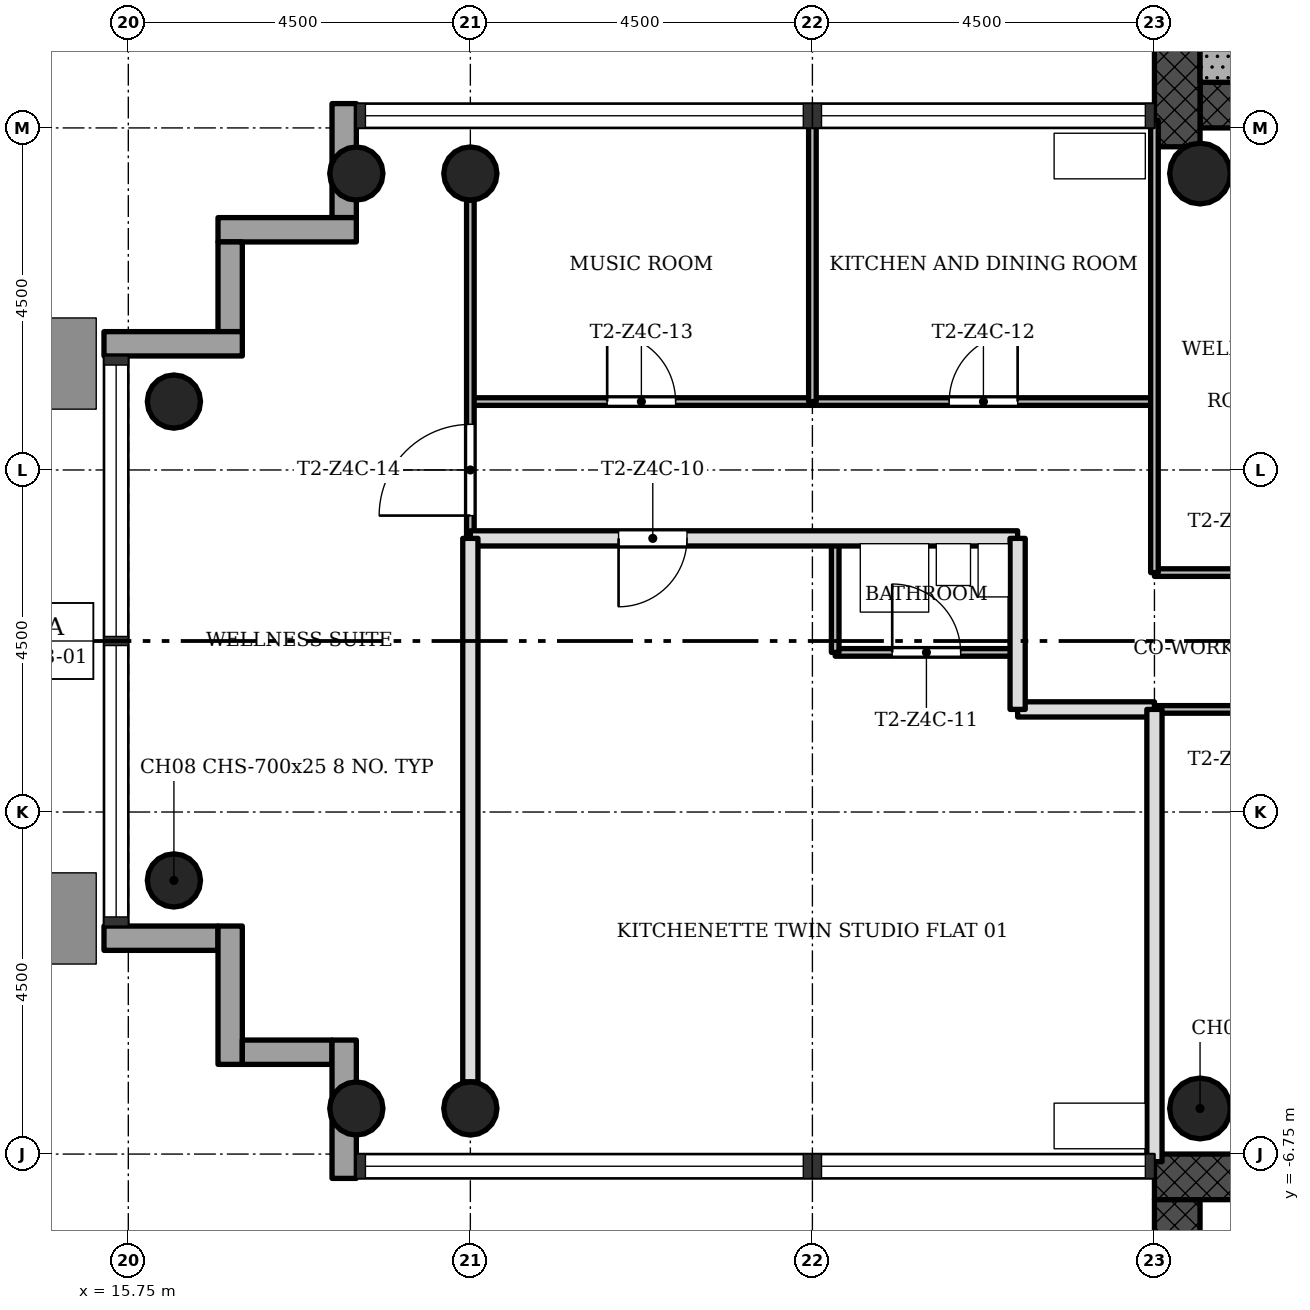
"""IFC4 building model, lengths in metres.
Left out: names, types, materials, properties, quantities, classifications, styles, units other than length and angle.
Written with IfcOpenShell. Run it as: python <this file> out.ifc"""

import sys

from ifc_helpers import new_model, si_unit, direction, frame, frame_2d, origin, origin_2d, place, context, subcontext, project, spatial, rectangle, hollow_circle, extrude, element, fill, save


model = new_model("IFC4")
c1 = context("Model", 3, precision=1e-05, world=origin(), true_north=direction((0.0, 1.0)))
c2 = subcontext(c1, "Body", "Model", "MODEL_VIEW")
j1 = project(units=[si_unit("LENGTHUNIT", "METRE"), si_unit("PLANEANGLEUNIT", "RADIAN")], contexts=[c1])
p1 = place(None, origin())
s1 = spatial("IfcSite", under=j1, at=p1, CompositionType="ELEMENT")
p2 = place(p1, origin())
s2 = spatial("IfcBuilding", under=s1, at=p2, CompositionType="ELEMENT")
p3 = place(p2, frame((0.0, 0.0, 189.2)))
s3 = spatial("IfcBuildingStorey", under=s2, at=p3, CompositionType="ELEMENT", Elevation=189.2)
p4 = place(p3, frame((29.85, 7.05, 0.0), z_axis=(0.0, 0.0, 1.0), x_axis=(1.0, 0.0, 0.0)))
e1 = element("IfcWall", 1, at=p4, inside=s3, PredefinedType="SHEAR", context=c2, shape_type="SweptSolid", body=[
    extrude(rectangle(XDim=12.9, YDim=0.6, at=frame_2d((6.45, 0.0))), origin(), (0.0, 0.0, 1.0), 3.4),
])
p5 = place(p4, frame((5.25, 0.0, 0.0)))
e2 = element("IfcOpeningElement", 2, at=p5, cuts=e1, PredefinedType="OPENING", context=c2, shape_type="SweptSolid", body=[
    extrude(rectangle(XDim=1.8, YDim=2.1, at=frame_2d((0.9, 1.05))), frame((0.0, 0.31, 0.0), z_axis=(0.0, -1.0, 0.0), x_axis=(1.0, 0.0, 0.0)), (0.0, 0.0, 1.0), 0.62),
])
p6 = place(p3, frame((29.55, 15.15, 0.0), z_axis=(0.0, 0.0, 1.0), x_axis=(0.0, -1.0, 0.0)))
e3 = element("IfcWall", 3, at=p6, inside=s3, PredefinedType="SHEAR", context=c2, shape_type="SweptSolid", body=[
    extrude(rectangle(XDim=8.648, YDim=0.6, at=frame_2d((4.324, 0.0))), origin(), (0.0, 0.0, 1.0), 3.4),
])
p7 = place(p3, frame((42.15, -7.05, 0.0), z_axis=(0.0, 0.0, 1.0), x_axis=(-1.0, 0.0, 0.0)))
e4 = element("IfcWall", 4, at=p7, inside=s3, PredefinedType="SHEAR", context=c2, shape_type="SweptSolid", body=[
    extrude(rectangle(XDim=12.9, YDim=0.6, at=frame_2d((6.45, 0.0))), origin(), (0.0, 0.0, 1.0), 3.4),
])
p8 = place(p7, frame((5.25, 0.0, 0.0)))
e5 = element("IfcOpeningElement", 5, at=p8, cuts=e4, PredefinedType="OPENING", context=c2, shape_type="SweptSolid", body=[
    extrude(rectangle(XDim=1.8, YDim=2.1, at=frame_2d((0.9, 1.05))), frame((0.0, 0.31, 0.0), z_axis=(0.0, -1.0, 0.0), x_axis=(1.0, 0.0, 0.0)), (0.0, 0.0, 1.0), 0.62),
])
p9 = place(p3, frame((29.55, -7.35, 0.0), z_axis=(0.0, 0.0, 1.0), x_axis=(0.0, -1.0, 0.0)))
e6 = element("IfcWall", 6, at=p9, inside=s3, PredefinedType="SHEAR", context=c2, shape_type="SweptSolid", body=[
    extrude(rectangle(XDim=8.4, YDim=0.6, at=frame_2d((4.2, 0.0))), origin(), (0.0, 0.0, 1.0), 3.4),
])
for number, where, z_axis, x_axis in (
    (7, (20.25, 6.15, 0.0), (0.0, 0.0, 1.0), (1.0, 0.0, 0.0)),
    (8, (20.25, -6.15, 0.0), (0.0, 0.0, 1.0), (1.0, 0.0, 0.0)),
    (9, (18.75, 6.15, 0.0), (0.0, 0.0, 1.0), (1.0, 0.0, 0.0)),
    (10, (18.75, -6.15, 0.0), (0.0, 0.0, 1.0), (1.0, 0.0, 0.0)),
    (11, (16.35, 3.15, 0.0), (0.0, 0.0, 1.0), (1.0, 0.0, 0.0)),
    (12, (16.35, -3.15, 0.0), (0.0, 0.0, 1.0), (1.0, 0.0, 0.0)),
):
    element("IfcColumn", number, at=place(p3, frame(where, z_axis=z_axis, x_axis=x_axis)), inside=s3, PredefinedType="COLUMN", context=c2, shape_type="SweptSolid", body=[
        extrude(hollow_circle(Radius=0.35, WallThickness=0.025, at=origin_2d()), origin(), (0.0, 0.0, 1.0), 3.4),
    ])
for number, where, z_axis, x_axis in (
    (13, (29.85, 6.15, 0.0), (0.0, 0.0, 1.0), (1.0, 0.0, 0.0)),
    (14, (29.85, -6.15, 0.0), (0.0, 0.0, 1.0), (1.0, 0.0, 0.0)),
):
    element("IfcColumn", number, at=place(p3, frame(where, z_axis=z_axis, x_axis=x_axis)), inside=s3, PredefinedType="COLUMN", context=c2, shape_type="SweptSolid", body=[
        extrude(hollow_circle(Radius=0.4, WallThickness=0.028, at=origin_2d()), origin(), (0.0, 0.0, 1.0), 3.4),
    ])
p10 = place(p3, frame((18.59, 7.07, -0.3), z_axis=(0.0, 0.0, 1.0), x_axis=(0.0, -1.0, 0.0)))
e15 = element("IfcWall", 15, at=p10, inside=s3, PredefinedType="STANDARD", context=c2, shape_type="SweptSolid", body=[
    extrude(rectangle(XDim=1.5, YDim=0.32, at=frame_2d((0.75, 0.0))), origin(), (0.0, 0.0, 1.0), 3.4),
])
p11 = place(p3, frame((18.75, 5.41, -0.3), z_axis=(0.0, 0.0, 1.0), x_axis=(-1.0, 0.0, 0.0)))
e16 = element("IfcWall", 16, at=p11, inside=s3, PredefinedType="STANDARD", context=c2, shape_type="SweptSolid", body=[
    extrude(rectangle(XDim=1.82, YDim=0.32, at=frame_2d((0.91, 0.0))), origin(), (0.0, 0.0, 1.0), 3.4),
])
p12 = place(p3, frame((17.09, 5.25, -0.3), z_axis=(0.0, 0.0, 1.0), x_axis=(0.0, -1.0, 0.0)))
e17 = element("IfcWall", 17, at=p12, inside=s3, PredefinedType="STANDARD", context=c2, shape_type="SweptSolid", body=[
    extrude(rectangle(XDim=1.18, YDim=0.32, at=frame_2d((0.59, 0.0))), origin(), (0.0, 0.0, 1.0), 3.4),
])
p13 = place(p3, frame((17.25, 3.91, -0.3), z_axis=(0.0, 0.0, 1.0), x_axis=(-1.0, 0.0, 0.0)))
e18 = element("IfcWall", 18, at=p13, inside=s3, PredefinedType="STANDARD", context=c2, shape_type="SweptSolid", body=[
    extrude(rectangle(XDim=1.82, YDim=0.32, at=frame_2d((0.91, 0.0))), origin(), (0.0, 0.0, 1.0), 3.4),
])
p14 = place(p3, frame((15.43, -3.91, -0.3), z_axis=(0.0, 0.0, 1.0), x_axis=(1.0, 0.0, 0.0)))
e19 = element("IfcWall", 19, at=p14, inside=s3, PredefinedType="STANDARD", context=c2, shape_type="SweptSolid", body=[
    extrude(rectangle(XDim=1.5, YDim=0.32, at=frame_2d((0.75, 0.0))), origin(), (0.0, 0.0, 1.0), 3.4),
])
p15 = place(p3, frame((17.09, -3.75, -0.3), z_axis=(0.0, 0.0, 1.0), x_axis=(0.0, -1.0, 0.0)))
e20 = element("IfcWall", 20, at=p15, inside=s3, PredefinedType="STANDARD", context=c2, shape_type="SweptSolid", body=[
    extrude(rectangle(XDim=1.82, YDim=0.32, at=frame_2d((0.91, 0.0))), origin(), (0.0, 0.0, 1.0), 3.4),
])
p16 = place(p3, frame((17.25, -5.41, -0.3), z_axis=(0.0, 0.0, 1.0), x_axis=(1.0, 0.0, 0.0)))
e21 = element("IfcWall", 21, at=p16, inside=s3, PredefinedType="STANDARD", context=c2, shape_type="SweptSolid", body=[
    extrude(rectangle(XDim=1.18, YDim=0.32, at=frame_2d((0.59, 0.0))), origin(), (0.0, 0.0, 1.0), 3.4),
])
p17 = place(p3, frame((18.59, -5.25, -0.3), z_axis=(0.0, 0.0, 1.0), x_axis=(0.0, -1.0, 0.0)))
e22 = element("IfcWall", 22, at=p17, inside=s3, PredefinedType="STANDARD", context=c2, shape_type="SweptSolid", body=[
    extrude(rectangle(XDim=1.82, YDim=0.32, at=frame_2d((0.91, 0.0))), origin(), (0.0, 0.0, 1.0), 3.4),
])
p18 = place(p3, frame((31.5, -0.9, 0.0), z_axis=(0.0, 0.0, 1.0), x_axis=(-1.0, 0.0, 0.0)))
e23 = element("IfcWall", 23, at=p18, inside=s3, PredefinedType="PARTITIONING", context=c2, shape_type="SweptSolid", body=[
    extrude(rectangle(XDim=2.25, YDim=0.1, at=frame_2d((1.125, 0.0))), origin(), (0.0, 0.0, 1.0), 3.0),
])
p19 = place(p3, frame((29.25, -0.9, 0.0), z_axis=(0.0, 0.0, 1.0), x_axis=(-1.0, 0.0, 0.0)))
e24 = element("IfcWall", 24, at=p19, inside=s3, PredefinedType="SOLIDWALL", context=c2, shape_type="SweptSolid", body=[
    extrude(rectangle(XDim=1.8, YDim=0.2, at=frame_2d((0.9, 0.0))), origin(), (0.0, 0.0, 1.0), 3.0),
])
p20 = place(p3, frame((27.45, -0.15, 0.0), z_axis=(0.0, 0.0, 1.0), x_axis=(-1.0, 0.0, 0.0)))
e25 = element("IfcWall", 25, at=p20, inside=s3, PredefinedType="PARTITIONING", context=c2, shape_type="SweptSolid", body=[
    extrude(rectangle(XDim=2.4, YDim=0.1, at=frame_2d((1.2, 0.0))), origin(), (0.0, 0.0, 1.0), 3.0),
])
p21 = place(p20, frame((0.75, 0.0, 0.0)))
e26 = element("IfcOpeningElement", 26, at=p21, cuts=e25, PredefinedType="OPENING", context=c2, shape_type="SweptSolid", body=[
    extrude(rectangle(XDim=0.9, YDim=2.1, at=frame_2d((0.45, 1.05))), frame((0.0, 0.06, 0.0), z_axis=(0.0, -1.0, 0.0), x_axis=(1.0, 0.0, 0.0)), (0.0, 0.0, 1.0), 0.12),
])
p22 = place(p3, frame((31.5, 0.9, 0.0), z_axis=(0.0, 0.0, 1.0), x_axis=(-1.0, 0.0, 0.0)))
e27 = element("IfcWall", 27, at=p22, inside=s3, PredefinedType="PARTITIONING", context=c2, shape_type="SweptSolid", body=[
    extrude(rectangle(XDim=2.25, YDim=0.1, at=frame_2d((1.125, 0.0))), origin(), (0.0, 0.0, 1.0), 3.0),
])
p23 = place(p3, frame((27.45, 1.35, 0.0), z_axis=(0.0, 0.0, 1.0), x_axis=(-1.0, 0.0, 0.0)))
e28 = element("IfcWall", 28, at=p23, inside=s3, PredefinedType="SOLIDWALL", context=c2, shape_type="SweptSolid", body=[
    extrude(rectangle(XDim=7.2, YDim=0.2, at=frame_2d((3.6, 0.0))), origin(), (0.0, 0.0, 1.0), 3.0),
])
p24 = place(p23, frame((4.35, 0.0, 0.0)))
e29 = element("IfcOpeningElement", 29, at=p24, cuts=e28, PredefinedType="OPENING", context=c2, shape_type="SweptSolid", body=[
    extrude(rectangle(XDim=0.9, YDim=2.1, at=frame_2d((0.45, 1.05))), frame((0.0, 0.11, 0.0), z_axis=(0.0, -1.0, 0.0), x_axis=(1.0, 0.0, 0.0)), (0.0, 0.0, 1.0), 0.22),
])
p25 = place(p3, frame((29.25, 3.15, 0.0), z_axis=(0.0, 0.0, 1.0), x_axis=(-1.0, 0.0, 0.0)))
e30 = element("IfcWall", 30, at=p25, inside=s3, PredefinedType="PARTITIONING", context=c2, shape_type="SweptSolid", body=[
    extrude(rectangle(XDim=9.0, YDim=0.1, at=frame_2d((4.5, 0.0))), origin(), (0.0, 0.0, 1.0), 3.0),
])
p26 = place(p25, frame((1.8, 0.0, 0.0)))
e31 = element("IfcOpeningElement", 31, at=p26, cuts=e30, PredefinedType="OPENING", context=c2, shape_type="SweptSolid", body=[
    extrude(rectangle(XDim=0.9, YDim=2.1, at=frame_2d((0.45, 1.05))), frame((0.0, 0.06, 0.0), z_axis=(0.0, -1.0, 0.0), x_axis=(1.0, 0.0, 0.0)), (0.0, 0.0, 1.0), 0.12),
])
p27 = place(p25, frame((6.3, 0.0, 0.0)))
e32 = element("IfcOpeningElement", 32, at=p27, cuts=e30, PredefinedType="OPENING", context=c2, shape_type="SweptSolid", body=[
    extrude(rectangle(XDim=0.9, YDim=2.1, at=frame_2d((0.45, 1.05))), frame((0.0, 0.06, 0.0), z_axis=(0.0, -1.0, 0.0), x_axis=(1.0, 0.0, 0.0)), (0.0, 0.0, 1.0), 0.12),
])
p28 = place(p3, frame((29.25, 0.9, 0.0), z_axis=(0.0, 0.0, 1.0), x_axis=(0.0, 1.0, 0.0)))
e33 = element("IfcWall", 33, at=p28, inside=s3, PredefinedType="PARTITIONING", context=c2, shape_type="SweptSolid", body=[
    extrude(rectangle(XDim=5.95, YDim=0.1, at=frame_2d((2.975, 0.0))), origin(), (0.0, 0.0, 1.0), 3.0),
])
p29 = place(p3, frame((29.25, -6.85, 0.0), z_axis=(0.0, 0.0, 1.0), x_axis=(0.0, 1.0, 0.0)))
e34 = element("IfcWall", 34, at=p29, inside=s3, PredefinedType="SOLIDWALL", context=c2, shape_type="SweptSolid", body=[
    extrude(rectangle(XDim=5.95, YDim=0.2, at=frame_2d((2.975, 0.0))), origin(), (0.0, 0.0, 1.0), 3.0),
])
p30 = place(p3, frame((27.45, -0.9, 0.0), z_axis=(0.0, 0.0, 1.0), x_axis=(0.0, 1.0, 0.0)))
e35 = element("IfcWall", 35, at=p30, inside=s3, PredefinedType="SOLIDWALL", context=c2, shape_type="SweptSolid", body=[
    extrude(rectangle(XDim=2.25, YDim=0.2, at=frame_2d((1.125, 0.0))), origin(), (0.0, 0.0, 1.0), 3.0),
])
p31 = place(p3, frame((25.05, -0.15, 0.0), z_axis=(0.0, 0.0, 1.0), x_axis=(0.0, 1.0, 0.0)))
e36 = element("IfcWall", 36, at=p31, inside=s3, PredefinedType="PARTITIONING", context=c2, shape_type="SweptSolid", body=[
    extrude(rectangle(XDim=1.5, YDim=0.1, at=frame_2d((0.75, 0.0))), origin(), (0.0, 0.0, 1.0), 3.0),
])
p32 = place(p3, frame((24.75, 3.15, 0.0), z_axis=(0.0, 0.0, 1.0), x_axis=(0.0, 1.0, 0.0)))
e37 = element("IfcWall", 37, at=p32, inside=s3, PredefinedType="PARTITIONING", context=c2, shape_type="SweptSolid", body=[
    extrude(rectangle(XDim=3.7, YDim=0.1, at=frame_2d((1.85, 0.0))), origin(), (0.0, 0.0, 1.0), 3.0),
])
p33 = place(p3, frame((20.25, 1.35, 0.0), z_axis=(0.0, 0.0, 1.0), x_axis=(0.0, 1.0, 0.0)))
e38 = element("IfcWall", 38, at=p33, inside=s3, PredefinedType="PARTITIONING", context=c2, shape_type="SweptSolid", body=[
    extrude(rectangle(XDim=4.45, YDim=0.1, at=frame_2d((2.225, 0.0))), origin(), (0.0, 0.0, 1.0), 3.0),
])
p34 = place(p33, frame((0.3, 0.0, 0.0)))
e39 = element("IfcOpeningElement", 39, at=p34, cuts=e38, PredefinedType="OPENING", context=c2, shape_type="SweptSolid", body=[
    extrude(rectangle(XDim=1.2, YDim=2.1, at=frame_2d((0.6, 1.05))), frame((0.0, 0.06, 0.0), z_axis=(0.0, -1.0, 0.0), x_axis=(1.0, 0.0, 0.0)), (0.0, 0.0, 1.0), 0.12),
])
p35 = place(p3, frame((20.25, -5.8, 0.0), z_axis=(0.0, 0.0, 1.0), x_axis=(0.0, 1.0, 0.0)))
e40 = element("IfcWall", 40, at=p35, inside=s3, PredefinedType="SOLIDWALL", context=c2, shape_type="SweptSolid", body=[
    extrude(rectangle(XDim=7.15, YDim=0.2, at=frame_2d((3.575, 0.0))), origin(), (0.0, 0.0, 1.0), 3.0),
])
p36 = place(p3, frame((34.15, 7.65, 0.0), z_axis=(0.0, 0.0, 1.0), x_axis=(-1.0, 0.0, 0.0)))
e41 = element("IfcWall", 41, at=p36, inside=s3, PredefinedType="SHEAR", context=c2, shape_type="SweptSolid", body=[
    extrude(rectangle(XDim=4.3, YDim=0.6, at=frame_2d((2.15, 0.0))), origin(), (0.0, 0.0, 1.0), 3.4),
])
p37 = place(p24, origin())
e42 = element("IfcDoor", 42, at=p37, inside=s3, OperationType="SINGLE_SWING_LEFT", PredefinedType="DOOR", context=c2, shape_type="SweptSolid", body=[
    extrude(rectangle(XDim=0.9, YDim=2.1, at=frame_2d((0.45, 1.05))), frame((0.0, 0.025, 0.0), z_axis=(0.0, -1.0, 0.0), x_axis=(1.0, 0.0, 0.0)), (0.0, 0.0, 1.0), 0.05),
])
fill(e29, e42)
p38 = place(p21, origin())
e43 = element("IfcDoor", 43, at=p38, inside=s3, OperationType="SINGLE_SWING_RIGHT", PredefinedType="DOOR", context=c2, shape_type="SweptSolid", body=[
    extrude(rectangle(XDim=0.9, YDim=2.1, at=frame_2d((0.45, 1.05))), frame((0.0, 0.025, 0.0), z_axis=(0.0, -1.0, 0.0), x_axis=(1.0, 0.0, 0.0)), (0.0, 0.0, 1.0), 0.05),
])
fill(e26, e43)
p39 = place(p26, origin())
e44 = element("IfcDoor", 44, at=p39, inside=s3, OperationType="SINGLE_SWING_LEFT", PredefinedType="DOOR", context=c2, shape_type="SweptSolid", body=[
    extrude(rectangle(XDim=0.9, YDim=2.1, at=frame_2d((0.45, 1.05))), frame((0.0, 0.025, 0.0), z_axis=(0.0, -1.0, 0.0), x_axis=(1.0, 0.0, 0.0)), (0.0, 0.0, 1.0), 0.05),
])
fill(e31, e44)
p40 = place(p27, origin())
e45 = element("IfcDoor", 45, at=p40, inside=s3, OperationType="SINGLE_SWING_RIGHT", PredefinedType="DOOR", context=c2, shape_type="SweptSolid", body=[
    extrude(rectangle(XDim=0.9, YDim=2.1, at=frame_2d((0.45, 1.05))), frame((0.0, 0.025, 0.0), z_axis=(0.0, -1.0, 0.0), x_axis=(1.0, 0.0, 0.0)), (0.0, 0.0, 1.0), 0.05),
])
fill(e32, e45)
p41 = place(p34, origin())
e46 = element("IfcDoor", 46, at=p41, inside=s3, OperationType="SINGLE_SWING_RIGHT", PredefinedType="DOOR", context=c2, shape_type="SweptSolid", body=[
    extrude(rectangle(XDim=1.2, YDim=2.1, at=frame_2d((0.6, 1.05))), frame((0.0, 0.025, 0.0), z_axis=(0.0, -1.0, 0.0), x_axis=(1.0, 0.0, 0.0)), (0.0, 0.0, 1.0), 0.05),
])
fill(e39, e46)
save(model, sys.argv[1])
